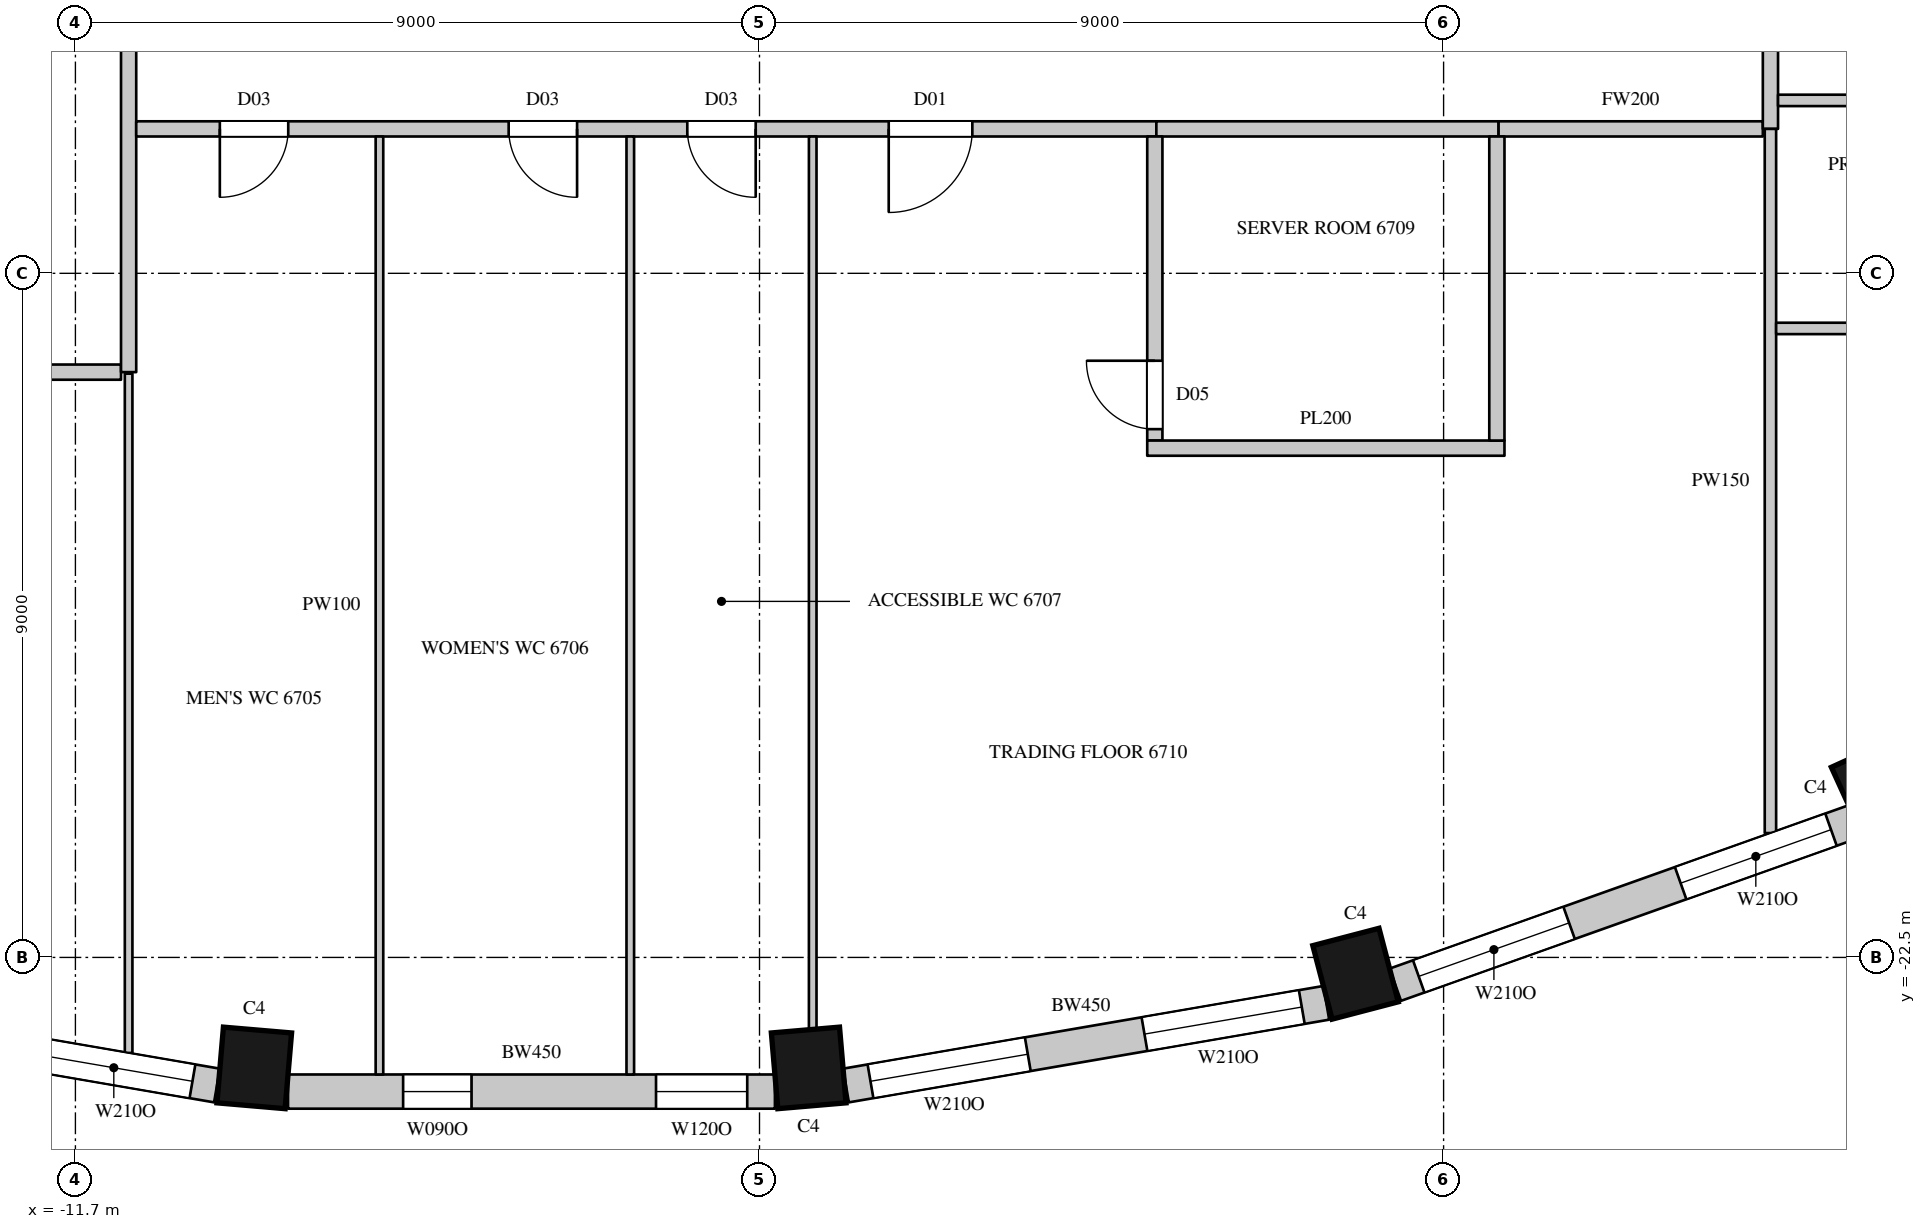
"""IFC4 building model, lengths in metres.
Left out: names, types, materials, properties, quantities, classifications, styles, units other than length and angle.
Written with IfcOpenShell. Run it as: python <this file> out.ifc"""

import sys

from ifc_helpers import new_model, si_unit, direction, frame, frame_2d, origin, origin_2d, place, context, subcontext, project, spatial, rectangle, extrude, element, fill, save


model = new_model("IFC4")
c1 = context("Model", 3, precision=1e-05, world=origin(), true_north=direction((0.0, 1.0)))
c2 = subcontext(c1, "Body", "Model", "MODEL_VIEW")
j1 = project(units=[si_unit("LENGTHUNIT", "METRE"), si_unit("PLANEANGLEUNIT", "RADIAN")], contexts=[c1])
p1 = place(None, origin())
s1 = spatial("IfcSite", under=j1, at=p1, CompositionType="ELEMENT")
p2 = place(p1, origin())
s2 = spatial("IfcBuilding", under=s1, at=p2, CompositionType="ELEMENT")
p3 = place(p2, frame((0.0, 0.0, 296.7)))
s3 = spatial("IfcBuildingStorey", under=s2, at=p3, CompositionType="ELEMENT", Elevation=296.7)
for number, where, z_axis, x_axis in (
    (1, (-9.347, -23.954, 0.0), (0.0, 0.0, 1.0), (0.996, -0.085, 0.0)),
    (2, (-2.053, -23.954, 0.0), (0.0, 0.0, 1.0), (0.996, 0.085, 0.0)),
    (3, (5.142, -22.715, 0.0), (0.0, 0.0, 1.0), (0.967, 0.253, 0.0)),
    (4, (12.019, -20.267, 0.0), (0.0, 0.0, 1.0), (0.91, 0.415, 0.0)),
):
    element("IfcColumn", number, at=place(p3, frame(where, z_axis=z_axis, x_axis=x_axis)), inside=s3, PredefinedType="COLUMN", context=c2, shape_type="SweptSolid", body=[
        extrude(rectangle(XDim=0.9, YDim=1.0, at=origin_2d()), origin(), (0.0, 0.0, 1.0), 4.1),
    ])
p4 = place(p3, frame((-16.157, -23.097, 0.0), z_axis=(0.0, 0.0, 1.0), x_axis=(0.985502073964, -0.169663379113, 0.0)))
e5 = element("IfcWall", 5, at=p4, inside=s3, PredefinedType="SOLIDWALL", context=c2, shape_type="SweptSolid", body=[
    extrude(rectangle(XDim=6.412, YDim=0.45, at=frame_2d((3.206, 0.0))), origin(), (0.0, 0.0, 1.0), 3.8),
])
p5 = place(p4, frame((0.327, 0.0, 1.05)))
e6 = element("IfcOpeningElement", 6, at=p5, cuts=e5, PredefinedType="OPENING", context=c2, shape_type="SweptSolid", body=[
    extrude(rectangle(XDim=2.1, YDim=2.4, at=frame_2d((1.05, 1.2))), frame((0.0, 0.235, 0.0), z_axis=(0.0, -1.0, 0.0), x_axis=(1.0, 0.0, 0.0)), (0.0, 0.0, 1.0), 0.47),
])
p6 = place(p4, frame((3.985, 0.0, 1.05)))
e7 = element("IfcOpeningElement", 7, at=p6, cuts=e5, PredefinedType="OPENING", context=c2, shape_type="SweptSolid", body=[
    extrude(rectangle(XDim=2.1, YDim=2.4, at=frame_2d((1.05, 1.2))), frame((0.0, 0.235, 0.0), z_axis=(0.0, -1.0, 0.0), x_axis=(1.0, 0.0, 0.0)), (0.0, 0.0, 1.0), 0.47),
])
p7 = place(p3, frame((-8.903, -24.265, 0.0), z_axis=(0.0, 0.0, 1.0), x_axis=(1.0, 0.0, 0.0)))
e8 = element("IfcWall", 8, at=p7, inside=s3, PredefinedType="SOLIDWALL", context=c2, shape_type="SweptSolid", body=[
    extrude(rectangle(XDim=6.406, YDim=0.45, at=frame_2d((3.203, 0.0))), origin(), (0.0, 0.0, 1.0), 3.8),
])
p8 = place(p7, frame((1.514, 0.0, 1.05)))
e9 = element("IfcOpeningElement", 9, at=p8, cuts=e8, PredefinedType="OPENING", context=c2, shape_type="SweptSolid", body=[
    extrude(rectangle(XDim=0.9, YDim=2.4, at=frame_2d((0.45, 1.2))), frame((0.0, 0.235, 0.0), z_axis=(0.0, -1.0, 0.0), x_axis=(1.0, 0.0, 0.0)), (0.0, 0.0, 1.0), 0.47),
])
p9 = place(p7, frame((4.841, 0.0, 1.05)))
e10 = element("IfcOpeningElement", 10, at=p9, cuts=e8, PredefinedType="OPENING", context=c2, shape_type="SweptSolid", body=[
    extrude(rectangle(XDim=1.2, YDim=2.4, at=frame_2d((0.6, 1.2))), frame((0.0, 0.235, 0.0), z_axis=(0.0, -1.0, 0.0), x_axis=(1.0, 0.0, 0.0)), (0.0, 0.0, 1.0), 0.47),
])
p10 = place(p3, frame((-1.562, -24.185, 0.0), z_axis=(0.0, 0.0, 1.0), x_axis=(0.985502073964, 0.169663379113, 0.0)))
e11 = element("IfcWall", 11, at=p10, inside=s3, PredefinedType="SOLIDWALL", context=c2, shape_type="SweptSolid", body=[
    extrude(rectangle(XDim=6.412, YDim=0.45, at=frame_2d((3.206, 0.0))), origin(), (0.0, 0.0, 1.0), 3.8),
])
p11 = place(p10, frame((0.327, 0.0, 1.05)))
e12 = element("IfcOpeningElement", 12, at=p11, cuts=e11, PredefinedType="OPENING", context=c2, shape_type="SweptSolid", body=[
    extrude(rectangle(XDim=2.1, YDim=2.4, at=frame_2d((1.05, 1.2))), frame((0.0, 0.235, 0.0), z_axis=(0.0, -1.0, 0.0), x_axis=(1.0, 0.0, 0.0)), (0.0, 0.0, 1.0), 0.47),
])
p12 = place(p10, frame((3.985, 0.0, 1.05)))
e13 = element("IfcOpeningElement", 13, at=p12, cuts=e11, PredefinedType="OPENING", context=c2, shape_type="SweptSolid", body=[
    extrude(rectangle(XDim=2.1, YDim=2.4, at=frame_2d((1.05, 1.2))), frame((0.0, 0.235, 0.0), z_axis=(0.0, -1.0, 0.0), x_axis=(1.0, 0.0, 0.0)), (0.0, 0.0, 1.0), 0.47),
])
p13 = place(p3, frame((5.665, -22.859, 0.0), z_axis=(0.0, 0.0, 1.0), x_axis=(0.942108340262, 0.335308626803, 0.0)))
e14 = element("IfcWall", 14, at=p13, inside=s3, PredefinedType="SOLIDWALL", context=c2, shape_type="SweptSolid", body=[
    extrude(rectangle(XDim=6.412, YDim=0.45, at=frame_2d((3.206, 0.0))), origin(), (0.0, 0.0, 1.0), 3.8),
])
p14 = place(p13, frame((0.327, 0.0, 1.05)))
e15 = element("IfcOpeningElement", 15, at=p14, cuts=e14, PredefinedType="OPENING", context=c2, shape_type="SweptSolid", body=[
    extrude(rectangle(XDim=2.1, YDim=2.4, at=frame_2d((1.05, 1.2))), frame((0.0, 0.235, 0.0), z_axis=(0.0, -1.0, 0.0), x_axis=(1.0, 0.0, 0.0)), (0.0, 0.0, 1.0), 0.47),
])
p15 = place(p13, frame((3.985, 0.0, 1.05)))
e16 = element("IfcOpeningElement", 16, at=p15, cuts=e14, PredefinedType="OPENING", context=c2, shape_type="SweptSolid", body=[
    extrude(rectangle(XDim=2.1, YDim=2.4, at=frame_2d((1.05, 1.2))), frame((0.0, 0.235, 0.0), z_axis=(0.0, -1.0, 0.0), x_axis=(1.0, 0.0, 0.0)), (0.0, 0.0, 1.0), 0.47),
])
p16 = place(p3, frame((-13.97, -14.8, 0.0), z_axis=(0.0, 0.0, 1.0), x_axis=(1.0, 0.0, 0.0)))
e17 = element("IfcWall", 17, at=p16, inside=s3, PredefinedType="PARTITIONING", context=c2, shape_type="SweptSolid", body=[
    extrude(rectangle(XDim=2.87, YDim=0.2, at=frame_2d((1.435, 0.0))), origin(), (0.0, 0.0, 1.0), 3.8),
])
p17 = place(p3, frame((-11.0, -14.8, 0.0), z_axis=(0.0, 0.0, 1.0), x_axis=(0.0, 1.0, 0.0)))
e18 = element("IfcWall", 18, at=p17, inside=s3, PredefinedType="PARTITIONING", context=c2, shape_type="SweptSolid", body=[
    extrude(rectangle(XDim=29.5, YDim=0.2, at=frame_2d((14.75, 0.0))), origin(), (0.0, 0.0, 1.0), 3.8),
])
p18 = place(p17, frame((10.5, 0.0, 0.0)))
e19 = element("IfcOpeningElement", 19, at=p18, cuts=e18, PredefinedType="OPENING", context=c2, shape_type="SweptSolid", body=[
    extrude(rectangle(XDim=1.5, YDim=2.4, at=frame_2d((0.75, 1.2))), frame((0.0, 0.11, 0.0), z_axis=(0.0, -1.0, 0.0), x_axis=(1.0, 0.0, 0.0)), (0.0, 0.0, 1.0), 0.22),
])
p19 = place(p3, frame((-10.9, -11.6, 0.0), z_axis=(0.0, 0.0, 1.0), x_axis=(1.0, 0.0, 0.0)))
e20 = element("IfcWall", 20, at=p19, inside=s3, PredefinedType="PARTITIONING", context=c2, shape_type="SweptSolid", body=[
    extrude(rectangle(XDim=13.421, YDim=0.2, at=frame_2d((6.71, 0.0))), origin(), (0.0, 0.0, 1.0), 3.8),
])
p20 = place(p19, frame((1.1, 0.0, 0.0)))
e21 = element("IfcOpeningElement", 21, at=p20, cuts=e20, PredefinedType="OPENING", context=c2, shape_type="SweptSolid", body=[
    extrude(rectangle(XDim=0.9, YDim=2.2, at=frame_2d((0.45, 1.1))), frame((0.0, 0.11, 0.0), z_axis=(0.0, -1.0, 0.0), x_axis=(1.0, 0.0, 0.0)), (0.0, 0.0, 1.0), 0.22),
])
p21 = place(p19, frame((4.9, 0.0, 0.0)))
e22 = element("IfcOpeningElement", 22, at=p21, cuts=e20, PredefinedType="OPENING", context=c2, shape_type="SweptSolid", body=[
    extrude(rectangle(XDim=0.9, YDim=2.2, at=frame_2d((0.45, 1.1))), frame((0.0, 0.11, 0.0), z_axis=(0.0, -1.0, 0.0), x_axis=(1.0, 0.0, 0.0)), (0.0, 0.0, 1.0), 0.22),
])
p22 = place(p19, frame((7.25, 0.0, 0.0)))
e23 = element("IfcOpeningElement", 23, at=p22, cuts=e20, PredefinedType="OPENING", context=c2, shape_type="SweptSolid", body=[
    extrude(rectangle(XDim=0.9, YDim=2.2, at=frame_2d((0.45, 1.1))), frame((0.0, 0.11, 0.0), z_axis=(0.0, -1.0, 0.0), x_axis=(1.0, 0.0, 0.0)), (0.0, 0.0, 1.0), 0.22),
])
p23 = place(p19, frame((9.9, 0.0, 0.0)))
e24 = element("IfcOpeningElement", 24, at=p23, cuts=e20, PredefinedType="OPENING", context=c2, shape_type="SweptSolid", body=[
    extrude(rectangle(XDim=1.1, YDim=2.4, at=frame_2d((0.55, 1.2))), frame((0.0, 0.11, 0.0), z_axis=(0.0, -1.0, 0.0), x_axis=(1.0, 0.0, 0.0)), (0.0, 0.0, 1.0), 0.22),
])
p24 = place(p3, frame((7.021, -11.6, 0.0), z_axis=(0.0, 0.0, 1.0), x_axis=(1.0, 0.0, 0.0)))
e25 = element("IfcWall", 25, at=p24, inside=s3, PredefinedType="PARTITIONING", context=c2, shape_type="SweptSolid", body=[
    extrude(rectangle(XDim=3.479, YDim=0.2, at=frame_2d((1.74, 0.0))), origin(), (0.0, 0.0, 1.0), 3.8),
])
p25 = place(p3, frame((10.6, -11.6, 0.0), z_axis=(0.0, 0.0, 1.0), x_axis=(0.0, 1.0, 0.0)))
e26 = element("IfcWall", 26, at=p25, inside=s3, PredefinedType="PARTITIONING", context=c2, shape_type="SweptSolid", body=[
    extrude(rectangle(XDim=23.7, YDim=0.2, at=frame_2d((11.85, 0.0))), origin(), (0.0, 0.0, 1.0), 3.8),
])
p26 = place(p25, frame((9.45, 0.0, 0.0)))
e27 = element("IfcOpeningElement", 27, at=p26, cuts=e26, PredefinedType="OPENING", context=c2, shape_type="SweptSolid", body=[
    extrude(rectangle(XDim=1.5, YDim=2.4, at=frame_2d((0.75, 1.2))), frame((0.0, 0.11, 0.0), z_axis=(0.0, -1.0, 0.0), x_axis=(1.0, 0.0, 0.0)), (0.0, 0.0, 1.0), 0.22),
])
p27 = place(p25, frame((19.45, 0.0, 0.0)))
e28 = element("IfcOpeningElement", 28, at=p27, cuts=e26, PredefinedType="OPENING", context=c2, shape_type="SweptSolid", body=[
    extrude(rectangle(XDim=1.1, YDim=2.4, at=frame_2d((0.55, 1.2))), frame((0.0, 0.11, 0.0), z_axis=(0.0, -1.0, 0.0), x_axis=(1.0, 0.0, 0.0)), (0.0, 0.0, 1.0), 0.22),
])
p28 = place(p25, frame((4.6, 0.0, 0.0)))
e29 = element("IfcOpeningElement", 29, at=p28, cuts=e26, PredefinedType="OPENING", context=c2, shape_type="SweptSolid", body=[
    extrude(rectangle(XDim=1.1, YDim=2.4, at=frame_2d((0.55, 1.2))), frame((0.0, 0.11, 0.0), z_axis=(0.0, -1.0, 0.0), x_axis=(1.0, 0.0, 0.0)), (0.0, 0.0, 1.0), 0.22),
])
p29 = place(p3, frame((10.6, -20.864, 0.0), z_axis=(0.0, 0.0, 1.0), x_axis=(0.0, 1.0, 0.0)))
e30 = element("IfcWall", 30, at=p29, inside=s3, PredefinedType="PARTITIONING", context=c2, shape_type="SweptSolid", body=[
    extrude(rectangle(XDim=9.264, YDim=0.15, at=frame_2d((4.632, 0.0))), origin(), (0.0, 0.0, 1.0), 3.8),
])
p30 = place(p3, frame((10.675, -14.225, 0.0), z_axis=(0.0, 0.0, 1.0), x_axis=(1.0, 0.0, 0.0)))
e31 = element("IfcWall", 31, at=p30, inside=s3, PredefinedType="PARTITIONING", context=c2, shape_type="SweptSolid", body=[
    extrude(rectangle(XDim=3.6, YDim=0.15, at=frame_2d((1.8, 0.0))), origin(), (0.0, 0.0, 1.0), 3.8),
])
p31 = place(p30, frame((1.3, 0.0, 0.0)))
e32 = element("IfcOpeningElement", 32, at=p31, cuts=e31, PredefinedType="OPENING", context=c2, shape_type="SweptSolid", body=[
    extrude(rectangle(XDim=0.9, YDim=2.2, at=frame_2d((0.45, 1.1))), frame((0.0, 0.085, 0.0), z_axis=(0.0, -1.0, 0.0), x_axis=(1.0, 0.0, 0.0)), (0.0, 0.0, 1.0), 0.17),
])
p32 = place(p3, frame((10.7, -11.225, 0.0), z_axis=(0.0, 0.0, 1.0), x_axis=(1.0, 0.0, 0.0)))
e33 = element("IfcWall", 33, at=p32, inside=s3, PredefinedType="PARTITIONING", context=c2, shape_type="SweptSolid", body=[
    extrude(rectangle(XDim=3.425, YDim=0.15, at=frame_2d((1.712, 0.0))), origin(), (0.0, 0.0, 1.0), 3.8),
])
p33 = place(p3, frame((2.521, -11.6, 0.0), z_axis=(0.0, 0.0, 1.0), x_axis=(1.0, 0.0, 0.0)))
e34 = element("IfcWall", 34, at=p33, inside=s3, PredefinedType="PARTITIONING", context=c2, shape_type="SweptSolid", body=[
    extrude(rectangle(XDim=4.5, YDim=0.2, at=frame_2d((2.25, 0.0))), origin(), (0.0, 0.0, 1.0), 3.8),
])
p34 = place(p3, frame((2.501, -15.7, 0.0), z_axis=(0.0, 0.0, 1.0), x_axis=(0.0, 1.0, 0.0)))
e35 = element("IfcWall", 35, at=p34, inside=s3, PredefinedType="PARTITIONING", context=c2, shape_type="SweptSolid", body=[
    extrude(rectangle(XDim=4.0, YDim=0.2, at=frame_2d((2.0, 0.0))), origin(), (0.0, 0.0, 1.0), 3.8),
])
p35 = place(p34, frame((0.15, 0.0, 0.0)))
e36 = element("IfcOpeningElement", 36, at=p35, cuts=e35, PredefinedType="OPENING", context=c2, shape_type="SweptSolid", body=[
    extrude(rectangle(XDim=0.9, YDim=2.2, at=frame_2d((0.45, 1.1))), frame((0.0, 0.11, 0.0), z_axis=(0.0, -1.0, 0.0), x_axis=(1.0, 0.0, 0.0)), (0.0, 0.0, 1.0), 0.22),
])
p36 = place(p3, frame((2.401, -15.8, 0.0), z_axis=(0.0, 0.0, 1.0), x_axis=(1.0, 0.0, 0.0)))
e37 = element("IfcWall", 37, at=p36, inside=s3, PredefinedType="PARTITIONING", context=c2, shape_type="SweptSolid", body=[
    extrude(rectangle(XDim=4.7, YDim=0.2, at=frame_2d((2.35, 0.0))), origin(), (0.0, 0.0, 1.0), 3.8),
])
p37 = place(p3, frame((7.001, -15.7, 0.0), z_axis=(0.0, 0.0, 1.0), x_axis=(0.0, 1.0, 0.0)))
e38 = element("IfcWall", 38, at=p37, inside=s3, PredefinedType="PARTITIONING", context=c2, shape_type="SweptSolid", body=[
    extrude(rectangle(XDim=4.0, YDim=0.2, at=frame_2d((2.0, 0.0))), origin(), (0.0, 0.0, 1.0), 3.8),
])
p38 = place(p3, frame((-11.0, -23.757, 0.0), z_axis=(0.0, 0.0, 1.0), x_axis=(0.0, 1.0, 0.0)))
e39 = element("IfcWall", 39, at=p38, inside=s3, PredefinedType="PARTITIONING", context=c2, shape_type="SweptSolid", body=[
    extrude(rectangle(XDim=8.937, YDim=0.1, at=frame_2d((4.468, 0.0))), origin(), (0.0, 0.0, 1.0), 3.8),
])
for number, where, z_axis, x_axis in (
    (40, (-7.7, -24.04, 0.0), (0.0, 0.0, 1.0), (0.0, 1.0, 0.0)),
    (41, (-4.4, -24.04, 0.0), (0.0, 0.0, 1.0), (0.0, 1.0, 0.0)),
):
    element("IfcWall", number, at=place(p3, frame(where, z_axis=z_axis, x_axis=x_axis)), inside=s3, PredefinedType="PARTITIONING", context=c2, shape_type="SweptSolid", body=[
        extrude(rectangle(XDim=12.34, YDim=0.1, at=frame_2d((6.17, 0.0))), origin(), (0.0, 0.0, 1.0), 3.8),
    ])
p39 = place(p3, frame((-2.0, -23.447, 0.0), z_axis=(0.0, 0.0, 1.0), x_axis=(0.0, 1.0, 0.0)))
e42 = element("IfcWall", 42, at=p39, inside=s3, PredefinedType="PARTITIONING", context=c2, shape_type="SweptSolid", body=[
    extrude(rectangle(XDim=11.747, YDim=0.1, at=frame_2d((5.874, 0.0))), origin(), (0.0, 0.0, 1.0), 3.8),
])
p40 = place(p6, origin())
e43 = element("IfcWindow", 43, at=p40, inside=s3, PartitioningType="SINGLE_PANEL", PredefinedType="WINDOW", context=c2, shape_type="SweptSolid", body=[
    extrude(rectangle(XDim=2.1, YDim=2.4, at=frame_2d((1.05, 1.2))), frame((0.0, 0.135, 0.0), z_axis=(0.0, -1.0, 0.0), x_axis=(1.0, 0.0, 0.0)), (0.0, 0.0, 1.0), 0.06),
])
fill(e7, e43)
p41 = place(p11, origin())
e44 = element("IfcWindow", 44, at=p41, inside=s3, PartitioningType="SINGLE_PANEL", PredefinedType="WINDOW", context=c2, shape_type="SweptSolid", body=[
    extrude(rectangle(XDim=2.1, YDim=2.4, at=frame_2d((1.05, 1.2))), frame((0.0, 0.135, 0.0), z_axis=(0.0, -1.0, 0.0), x_axis=(1.0, 0.0, 0.0)), (0.0, 0.0, 1.0), 0.06),
])
fill(e12, e44)
p42 = place(p12, origin())
e45 = element("IfcWindow", 45, at=p42, inside=s3, PartitioningType="SINGLE_PANEL", PredefinedType="WINDOW", context=c2, shape_type="SweptSolid", body=[
    extrude(rectangle(XDim=2.1, YDim=2.4, at=frame_2d((1.05, 1.2))), frame((0.0, 0.135, 0.0), z_axis=(0.0, -1.0, 0.0), x_axis=(1.0, 0.0, 0.0)), (0.0, 0.0, 1.0), 0.06),
])
fill(e13, e45)
p43 = place(p14, origin())
e46 = element("IfcWindow", 46, at=p43, inside=s3, PartitioningType="SINGLE_PANEL", PredefinedType="WINDOW", context=c2, shape_type="SweptSolid", body=[
    extrude(rectangle(XDim=2.1, YDim=2.4, at=frame_2d((1.05, 1.2))), frame((0.0, 0.135, 0.0), z_axis=(0.0, -1.0, 0.0), x_axis=(1.0, 0.0, 0.0)), (0.0, 0.0, 1.0), 0.06),
])
fill(e15, e46)
p44 = place(p15, origin())
e47 = element("IfcWindow", 47, at=p44, inside=s3, PartitioningType="SINGLE_PANEL", PredefinedType="WINDOW", context=c2, shape_type="SweptSolid", body=[
    extrude(rectangle(XDim=2.1, YDim=2.4, at=frame_2d((1.05, 1.2))), frame((0.0, 0.135, 0.0), z_axis=(0.0, -1.0, 0.0), x_axis=(1.0, 0.0, 0.0)), (0.0, 0.0, 1.0), 0.06),
])
fill(e16, e47)
p45 = place(p20, origin())
e48 = element("IfcDoor", 48, at=p45, inside=s3, OperationType="SINGLE_SWING_RIGHT", PredefinedType="DOOR", context=c2, shape_type="SweptSolid", body=[
    extrude(rectangle(XDim=0.9, YDim=2.2, at=frame_2d((0.45, 1.1))), frame((0.0, 0.025, 0.0), z_axis=(0.0, -1.0, 0.0), x_axis=(1.0, 0.0, 0.0)), (0.0, 0.0, 1.0), 0.05),
])
fill(e21, e48)
p46 = place(p21, origin())
e49 = element("IfcDoor", 49, at=p46, inside=s3, OperationType="SINGLE_SWING_LEFT", PredefinedType="DOOR", context=c2, shape_type="SweptSolid", body=[
    extrude(rectangle(XDim=0.9, YDim=2.2, at=frame_2d((0.45, 1.1))), frame((0.0, 0.025, 0.0), z_axis=(0.0, -1.0, 0.0), x_axis=(1.0, 0.0, 0.0)), (0.0, 0.0, 1.0), 0.05),
])
fill(e22, e49)
p47 = place(p22, origin())
e50 = element("IfcDoor", 50, at=p47, inside=s3, OperationType="SINGLE_SWING_LEFT", PredefinedType="DOOR", context=c2, shape_type="SweptSolid", body=[
    extrude(rectangle(XDim=0.9, YDim=2.2, at=frame_2d((0.45, 1.1))), frame((0.0, 0.025, 0.0), z_axis=(0.0, -1.0, 0.0), x_axis=(1.0, 0.0, 0.0)), (0.0, 0.0, 1.0), 0.05),
])
fill(e23, e50)
p48 = place(p23, origin())
e51 = element("IfcDoor", 51, at=p48, inside=s3, OperationType="SINGLE_SWING_RIGHT", PredefinedType="DOOR", context=c2, shape_type="SweptSolid", body=[
    extrude(rectangle(XDim=1.1, YDim=2.4, at=frame_2d((0.55, 1.2))), frame((0.0, 0.025, 0.0), z_axis=(0.0, -1.0, 0.0), x_axis=(1.0, 0.0, 0.0)), (0.0, 0.0, 1.0), 0.05),
])
fill(e24, e51)
p49 = place(p35, origin())
e52 = element("IfcDoor", 52, at=p49, inside=s3, OperationType="SINGLE_SWING_RIGHT", PredefinedType="DOOR", context=c2, shape_type="SweptSolid", body=[
    extrude(rectangle(XDim=0.9, YDim=2.2, at=frame_2d((0.45, 1.1))), frame((0.0, 0.025, 0.0), z_axis=(0.0, -1.0, 0.0), x_axis=(1.0, 0.0, 0.0)), (0.0, 0.0, 1.0), 0.05),
])
fill(e36, e52)
p50 = place(p8, origin())
e53 = element("IfcWindow", 53, at=p50, inside=s3, PartitioningType="SINGLE_PANEL", PredefinedType="WINDOW", context=c2, shape_type="SweptSolid", body=[
    extrude(rectangle(XDim=0.9, YDim=2.4, at=frame_2d((0.45, 1.2))), frame((0.0, 0.135, 0.0), z_axis=(0.0, -1.0, 0.0), x_axis=(1.0, 0.0, 0.0)), (0.0, 0.0, 1.0), 0.06),
])
fill(e9, e53)
p51 = place(p9, origin())
e54 = element("IfcWindow", 54, at=p51, inside=s3, PartitioningType="SINGLE_PANEL", PredefinedType="WINDOW", context=c2, shape_type="SweptSolid", body=[
    extrude(rectangle(XDim=1.2, YDim=2.4, at=frame_2d((0.6, 1.2))), frame((0.0, 0.135, 0.0), z_axis=(0.0, -1.0, 0.0), x_axis=(1.0, 0.0, 0.0)), (0.0, 0.0, 1.0), 0.06),
])
fill(e10, e54)
save(model, sys.argv[1])
